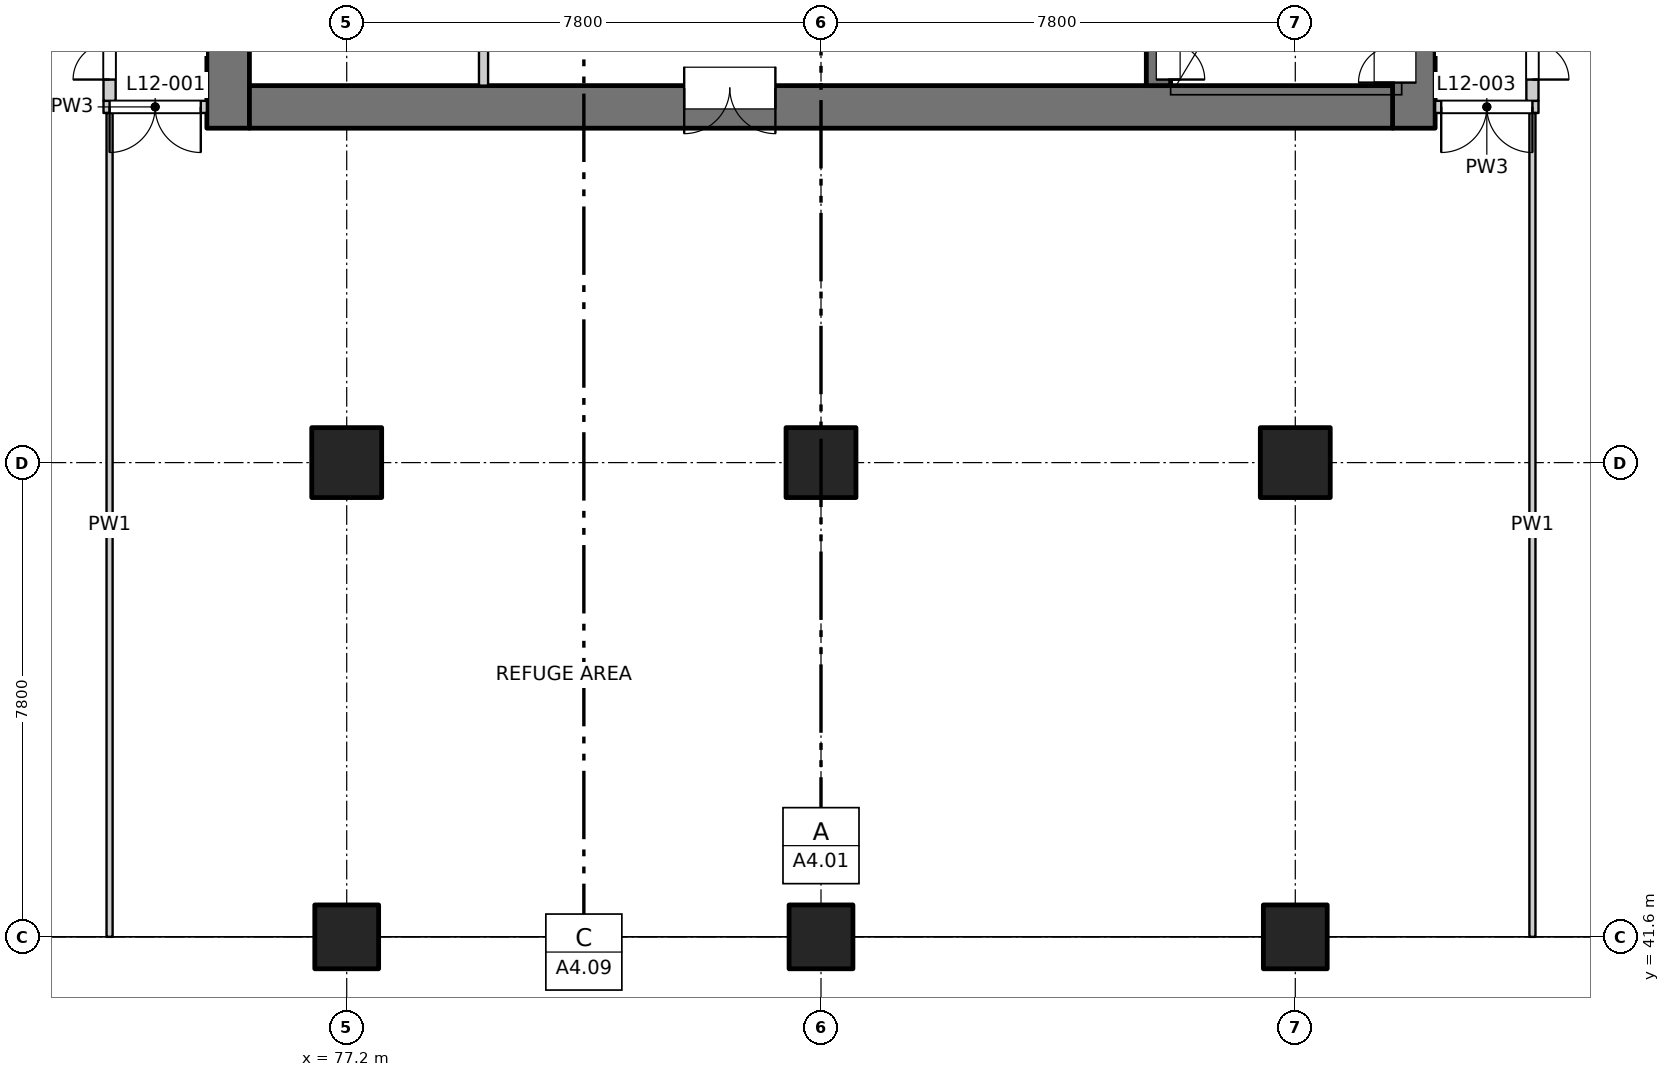
"""IFC4 building model, lengths in metres.
Left out: names, types, materials, properties, quantities, classifications, styles, units other than length and angle.
Written with IfcOpenShell. Run it as: python <this file> out.ifc"""

import sys

from ifc_helpers import new_model, si_unit, direction, frame, frame_2d, origin, origin_2d, place, context, subcontext, project, spatial, rectangle, extrude, element, fill, save


model = new_model("IFC4")
c1 = context("Model", 3, precision=1e-05, world=origin(), true_north=direction((0.0, 1.0)))
c2 = subcontext(c1, "Body", "Model", "MODEL_VIEW")
j1 = project(units=[si_unit("LENGTHUNIT", "METRE"), si_unit("PLANEANGLEUNIT", "RADIAN")], contexts=[c1])
p1 = place(None, origin())
s1 = spatial("IfcSite", under=j1, at=p1, CompositionType="ELEMENT")
p2 = place(p1, origin())
s2 = spatial("IfcBuilding", under=s1, at=p2, CompositionType="ELEMENT")
p3 = place(p2, frame((0.0, 0.0, 46.7)))
s3 = spatial("IfcBuildingStorey", under=s2, at=p3, CompositionType="ELEMENT", Elevation=46.7)
for number, where, z_axis, x_axis in (
    (1, (77.2, 41.6, -0.3), (0.0, 0.0, 1.0), (1.0, 0.0, 0.0)),
    (2, (85.0, 41.6, -0.3), (0.0, 0.0, 1.0), (1.0, 0.0, 0.0)),
    (3, (92.8, 41.6, -0.3), (0.0, 0.0, 1.0), (1.0, 0.0, 0.0)),
):
    element("IfcColumn", number, at=place(p3, frame(where, z_axis=z_axis, x_axis=x_axis)), inside=s3, PredefinedType="COLUMN", context=c2, shape_type="SweptSolid", body=[
        extrude(rectangle(XDim=1.05, YDim=1.05, at=origin_2d()), origin(), (0.0, 0.0, 1.0), 4.5),
    ])
for number, where, z_axis, x_axis in (
    (4, (77.2, 49.4, -0.3), (0.0, 0.0, 1.0), (1.0, 0.0, 0.0)),
    (5, (85.0, 49.4, -0.3), (0.0, 0.0, 1.0), (1.0, 0.0, 0.0)),
    (6, (92.8, 49.4, -0.3), (0.0, 0.0, 1.0), (1.0, 0.0, 0.0)),
):
    element("IfcColumn", number, at=place(p3, frame(where, z_axis=z_axis, x_axis=x_axis)), inside=s3, PredefinedType="COLUMN", context=c2, shape_type="SweptSolid", body=[
        extrude(rectangle(XDim=1.15, YDim=1.15, at=origin_2d()), origin(), (0.0, 0.0, 1.0), 4.5),
    ])
p4 = place(p3, frame((75.25, 54.9, -0.3), z_axis=(0.0, 0.0, 1.0), x_axis=(0.0, 1.0, 0.0)))
e7 = element("IfcWall", 7, at=p4, inside=s3, PredefinedType="SOLIDWALL", context=c2, shape_type="SweptSolid", body=[
    extrude(rectangle(XDim=22.4, YDim=0.7, at=frame_2d((11.2, 0.0))), origin(), (0.0, 0.0, 1.0), 4.5),
])
p5 = place(p4, frame((7.55, 0.0, 0.3)))
e8 = element("IfcOpeningElement", 8, at=p5, cuts=e7, PredefinedType="OPENING", context=c2, shape_type="SweptSolid", body=[
    extrude(rectangle(XDim=0.9, YDim=2.1, at=frame_2d((0.45, 1.05))), frame((0.0, 0.36, 0.0), z_axis=(0.0, -1.0, 0.0), x_axis=(1.0, 0.0, 0.0)), (0.0, 0.0, 1.0), 0.72),
])
p6 = place(p4, frame((10.85, 0.0, 0.3)))
e9 = element("IfcOpeningElement", 9, at=p6, cuts=e7, PredefinedType="OPENING", context=c2, shape_type="SweptSolid", body=[
    extrude(rectangle(XDim=0.9, YDim=2.1, at=frame_2d((0.45, 1.05))), frame((0.0, 0.36, 0.0), z_axis=(0.0, -1.0, 0.0), x_axis=(1.0, 0.0, 0.0)), (0.0, 0.0, 1.0), 0.72),
])
p7 = place(p4, frame((15.35, 0.0, 0.3)))
e10 = element("IfcOpeningElement", 10, at=p7, cuts=e7, PredefinedType="OPENING", context=c2, shape_type="SweptSolid", body=[
    extrude(rectangle(XDim=0.9, YDim=2.1, at=frame_2d((0.45, 1.05))), frame((0.0, 0.36, 0.0), z_axis=(0.0, -1.0, 0.0), x_axis=(1.0, 0.0, 0.0)), (0.0, 0.0, 1.0), 0.72),
])
p8 = place(p4, frame((20.15, 0.0, 0.3)))
e11 = element("IfcOpeningElement", 11, at=p8, cuts=e7, PredefinedType="OPENING", context=c2, shape_type="SweptSolid", body=[
    extrude(rectangle(XDim=0.9, YDim=2.1, at=frame_2d((0.45, 1.05))), frame((0.0, 0.36, 0.0), z_axis=(0.0, -1.0, 0.0), x_axis=(1.0, 0.0, 0.0)), (0.0, 0.0, 1.0), 0.72),
])
p9 = place(p3, frame((94.75, 54.9, -0.3), z_axis=(0.0, 0.0, 1.0), x_axis=(0.0, 1.0, 0.0)))
e12 = element("IfcWall", 12, at=p9, inside=s3, PredefinedType="SOLIDWALL", context=c2, shape_type="SweptSolid", body=[
    extrude(rectangle(XDim=7.05, YDim=0.7, at=frame_2d((3.525, 0.0))), origin(), (0.0, 0.0, 1.0), 4.5),
])
p10 = place(p9, frame((0.75, 0.0, 0.3)))
e13 = element("IfcOpeningElement", 13, at=p10, cuts=e12, PredefinedType="OPENING", context=c2, shape_type="SweptSolid", body=[
    extrude(rectangle(XDim=1.2, YDim=2.1, at=frame_2d((0.6, 1.05))), frame((0.0, 0.36, 0.0), z_axis=(0.0, -1.0, 0.0), x_axis=(1.0, 0.0, 0.0)), (0.0, 0.0, 1.0), 0.72),
])
p11 = place(p3, frame((75.6, 55.25, -0.3), z_axis=(0.0, 0.0, 1.0), x_axis=(1.0, 0.0, 0.0)))
e14 = element("IfcWall", 14, at=p11, inside=s3, PredefinedType="SOLIDWALL", context=c2, shape_type="SweptSolid", body=[
    extrude(rectangle(XDim=18.8, YDim=0.7, at=frame_2d((9.4, 0.0))), origin(), (0.0, 0.0, 1.0), 4.5),
])
p12 = place(p11, frame((7.15, 0.0, 0.3)))
e15 = element("IfcOpeningElement", 15, at=p12, cuts=e14, PredefinedType="OPENING", context=c2, shape_type="SweptSolid", body=[
    extrude(rectangle(XDim=1.5, YDim=2.1, at=frame_2d((0.75, 1.05))), frame((0.0, 0.36, 0.0), z_axis=(0.0, -1.0, 0.0), x_axis=(1.0, 0.0, 0.0)), (0.0, 0.0, 1.0), 0.72),
])
p13 = place(p3, frame((90.55, 55.6, -0.3), z_axis=(0.0, 0.0, 1.0), x_axis=(0.0, 1.0, 0.0)))
e16 = element("IfcWall", 16, at=p13, inside=s3, PredefinedType="SOLIDWALL", context=c2, shape_type="SweptSolid", body=[
    extrude(rectangle(XDim=6.35, YDim=0.4, at=frame_2d((3.175, 0.0))), origin(), (0.0, 0.0, 1.0), 4.5),
])
p14 = place(p13, frame((0.1, 0.0, 0.3)))
e17 = element("IfcOpeningElement", 17, at=p14, cuts=e16, PredefinedType="OPENING", context=c2, shape_type="SweptSolid", body=[
    extrude(rectangle(XDim=1.2, YDim=2.1, at=frame_2d((0.6, 1.05))), frame((0.0, 0.21, 0.0), z_axis=(0.0, -1.0, 0.0), x_axis=(1.0, 0.0, 0.0)), (0.0, 0.0, 1.0), 0.42),
])
p15 = place(p3, frame((73.2, 55.25, 0.0), z_axis=(0.0, 0.0, 1.0), x_axis=(1.0, 0.0, 0.0)))
e18 = element("IfcWall", 18, at=p15, inside=s3, PredefinedType="PARTITIONING", context=c2, shape_type="SweptSolid", body=[
    extrude(rectangle(XDim=1.7, YDim=0.2, at=frame_2d((0.85, 0.0))), origin(), (0.0, 0.0, 1.0), 4.2),
])
p16 = place(p15, frame((0.1, 0.0, 0.0)))
e19 = element("IfcOpeningElement", 19, at=p16, cuts=e18, PredefinedType="OPENING", context=c2, shape_type="SweptSolid", body=[
    extrude(rectangle(XDim=1.5, YDim=2.1, at=frame_2d((0.75, 1.05))), frame((0.0, 0.11, 0.0), z_axis=(0.0, -1.0, 0.0), x_axis=(1.0, 0.0, 0.0)), (0.0, 0.0, 1.0), 0.22),
])
p17 = place(p3, frame((95.1, 55.25, 0.0), z_axis=(0.0, 0.0, 1.0), x_axis=(1.0, 0.0, 0.0)))
e20 = element("IfcWall", 20, at=p17, inside=s3, PredefinedType="PARTITIONING", context=c2, shape_type="SweptSolid", body=[
    extrude(rectangle(XDim=1.7, YDim=0.2, at=frame_2d((0.85, 0.0))), origin(), (0.0, 0.0, 1.0), 4.2),
])
p18 = place(p17, frame((0.1, 0.0, 0.0)))
e21 = element("IfcOpeningElement", 21, at=p18, cuts=e20, PredefinedType="OPENING", context=c2, shape_type="SweptSolid", body=[
    extrude(rectangle(XDim=1.5, YDim=2.1, at=frame_2d((0.75, 1.05))), frame((0.0, 0.11, 0.0), z_axis=(0.0, -1.0, 0.0), x_axis=(1.0, 0.0, 0.0)), (0.0, 0.0, 1.0), 0.22),
])
p19 = place(p3, frame((73.3, 41.6, 0.0), z_axis=(0.0, 0.0, 1.0), x_axis=(0.0, 1.0, 0.0)))
e22 = element("IfcWall", 22, at=p19, inside=s3, PredefinedType="PARTITIONING", context=c2, shape_type="SweptSolid", body=[
    extrude(rectangle(XDim=13.55, YDim=0.1, at=frame_2d((6.775, 0.0))), origin(), (0.0, 0.0, 1.0), 4.2),
])
p20 = place(p3, frame((73.3, 55.35, 0.0), z_axis=(0.0, 0.0, 1.0), x_axis=(0.0, 1.0, 0.0)))
e23 = element("IfcWall", 23, at=p20, inside=s3, PredefinedType="PARTITIONING", context=c2, shape_type="SweptSolid", body=[
    extrude(rectangle(XDim=29.15, YDim=0.2, at=frame_2d((14.575, 0.0))), origin(), (0.0, 0.0, 1.0), 4.2),
])
p21 = place(p20, frame((0.35, 0.0, 0.0)))
e24 = element("IfcOpeningElement", 24, at=p21, cuts=e23, PredefinedType="OPENING", context=c2, shape_type="SweptSolid", body=[
    extrude(rectangle(XDim=1.2, YDim=2.1, at=frame_2d((0.6, 1.05))), frame((0.0, 0.11, 0.0), z_axis=(0.0, -1.0, 0.0), x_axis=(1.0, 0.0, 0.0)), (0.0, 0.0, 1.0), 0.22),
])
p22 = place(p20, frame((7.1, 0.0, 0.0)))
e25 = element("IfcOpeningElement", 25, at=p22, cuts=e23, PredefinedType="OPENING", context=c2, shape_type="SweptSolid", body=[
    extrude(rectangle(XDim=1.2, YDim=2.1, at=frame_2d((0.6, 1.05))), frame((0.0, 0.11, 0.0), z_axis=(0.0, -1.0, 0.0), x_axis=(1.0, 0.0, 0.0)), (0.0, 0.0, 1.0), 0.22),
])
p23 = place(p20, frame((18.8, 0.0, 0.0)))
e26 = element("IfcOpeningElement", 26, at=p23, cuts=e23, PredefinedType="OPENING", context=c2, shape_type="SweptSolid", body=[
    extrude(rectangle(XDim=1.2, YDim=2.1, at=frame_2d((0.6, 1.05))), frame((0.0, 0.11, 0.0), z_axis=(0.0, -1.0, 0.0), x_axis=(1.0, 0.0, 0.0)), (0.0, 0.0, 1.0), 0.22),
])
p24 = place(p20, frame((26.6, 0.0, 0.0)))
e27 = element("IfcOpeningElement", 27, at=p24, cuts=e23, PredefinedType="OPENING", context=c2, shape_type="SweptSolid", body=[
    extrude(rectangle(XDim=1.2, YDim=2.1, at=frame_2d((0.6, 1.05))), frame((0.0, 0.11, 0.0), z_axis=(0.0, -1.0, 0.0), x_axis=(1.0, 0.0, 0.0)), (0.0, 0.0, 1.0), 0.22),
])
p25 = place(p3, frame((79.45, 55.6, 0.0), z_axis=(0.0, 0.0, 1.0), x_axis=(0.0, 1.0, 0.0)))
e28 = element("IfcWall", 28, at=p25, inside=s3, PredefinedType="PARTITIONING", context=c2, shape_type="SweptSolid", body=[
    extrude(rectangle(XDim=5.3, YDim=0.15, at=frame_2d((2.65, 0.0))), origin(), (0.0, 0.0, 1.0), 4.2),
])
p26 = place(p25, frame((2.1, 0.0, 0.0)))
e29 = element("IfcOpeningElement", 29, at=p26, cuts=e28, PredefinedType="OPENING", context=c2, shape_type="SweptSolid", body=[
    extrude(rectangle(XDim=0.9, YDim=2.1, at=frame_2d((0.45, 1.05))), frame((0.0, 0.085, 0.0), z_axis=(0.0, -1.0, 0.0), x_axis=(1.0, 0.0, 0.0)), (0.0, 0.0, 1.0), 0.17),
])
p27 = place(p3, frame((96.7, 41.6, 0.0), z_axis=(0.0, 0.0, 1.0), x_axis=(0.0, 1.0, 0.0)))
e30 = element("IfcWall", 30, at=p27, inside=s3, PredefinedType="PARTITIONING", context=c2, shape_type="SweptSolid", body=[
    extrude(rectangle(XDim=13.55, YDim=0.1, at=frame_2d((6.775, 0.0))), origin(), (0.0, 0.0, 1.0), 4.2),
])
p28 = place(p3, frame((96.7, 55.35, 0.0), z_axis=(0.0, 0.0, 1.0), x_axis=(0.0, 1.0, 0.0)))
e31 = element("IfcWall", 31, at=p28, inside=s3, PredefinedType="PARTITIONING", context=c2, shape_type="SweptSolid", body=[
    extrude(rectangle(XDim=29.15, YDim=0.2, at=frame_2d((14.575, 0.0))), origin(), (0.0, 0.0, 1.0), 4.2),
])
p29 = place(p28, frame((0.35, 0.0, 0.0)))
e32 = element("IfcOpeningElement", 32, at=p29, cuts=e31, PredefinedType="OPENING", context=c2, shape_type="SweptSolid", body=[
    extrude(rectangle(XDim=1.2, YDim=2.1, at=frame_2d((0.6, 1.05))), frame((0.0, 0.11, 0.0), z_axis=(0.0, -1.0, 0.0), x_axis=(1.0, 0.0, 0.0)), (0.0, 0.0, 1.0), 0.22),
])
p30 = place(p28, frame((7.1, 0.0, 0.0)))
e33 = element("IfcOpeningElement", 33, at=p30, cuts=e31, PredefinedType="OPENING", context=c2, shape_type="SweptSolid", body=[
    extrude(rectangle(XDim=1.2, YDim=2.1, at=frame_2d((0.6, 1.05))), frame((0.0, 0.11, 0.0), z_axis=(0.0, -1.0, 0.0), x_axis=(1.0, 0.0, 0.0)), (0.0, 0.0, 1.0), 0.22),
])
p31 = place(p28, frame((22.7, 0.0, 0.0)))
e34 = element("IfcOpeningElement", 34, at=p31, cuts=e31, PredefinedType="OPENING", context=c2, shape_type="SweptSolid", body=[
    extrude(rectangle(XDim=1.2, YDim=2.1, at=frame_2d((0.6, 1.05))), frame((0.0, 0.11, 0.0), z_axis=(0.0, -1.0, 0.0), x_axis=(1.0, 0.0, 0.0)), (0.0, 0.0, 1.0), 0.22),
])
p32 = place(p28, frame((26.6, 0.0, 0.0)))
e35 = element("IfcOpeningElement", 35, at=p32, cuts=e31, PredefinedType="OPENING", context=c2, shape_type="SweptSolid", body=[
    extrude(rectangle(XDim=1.2, YDim=2.1, at=frame_2d((0.6, 1.05))), frame((0.0, 0.11, 0.0), z_axis=(0.0, -1.0, 0.0), x_axis=(1.0, 0.0, 0.0)), (0.0, 0.0, 1.0), 0.22),
])
p33 = place(p16, origin())
e36 = element("IfcDoor", 36, at=p33, inside=s3, OperationType="DOUBLE_DOOR_SINGLE_SWING", PredefinedType="DOOR", context=c2, shape_type="SweptSolid", body=[
    extrude(rectangle(XDim=1.5, YDim=2.1, at=frame_2d((0.75, 1.05))), frame((0.0, 0.025, 0.0), z_axis=(0.0, -1.0, 0.0), x_axis=(1.0, 0.0, 0.0)), (0.0, 0.0, 1.0), 0.05),
])
fill(e19, e36)
p34 = place(p12, origin())
e37 = element("IfcDoor", 37, at=p34, inside=s3, OperationType="DOUBLE_DOOR_SINGLE_SWING", PredefinedType="DOOR", context=c2, shape_type="SweptSolid", body=[
    extrude(rectangle(XDim=1.5, YDim=2.1, at=frame_2d((0.75, 1.05))), frame((0.0, 0.335, 0.0), z_axis=(0.0, -1.0, 0.0), x_axis=(1.0, 0.0, 0.0)), (0.0, 0.0, 1.0), 0.05),
])
fill(e15, e37)
p35 = place(p18, origin())
e38 = element("IfcDoor", 38, at=p35, inside=s3, OperationType="DOUBLE_DOOR_SINGLE_SWING", PredefinedType="DOOR", context=c2, shape_type="SweptSolid", body=[
    extrude(rectangle(XDim=1.5, YDim=2.1, at=frame_2d((0.75, 1.05))), frame((0.0, 0.025, 0.0), z_axis=(0.0, -1.0, 0.0), x_axis=(1.0, 0.0, 0.0)), (0.0, 0.0, 1.0), 0.05),
])
fill(e21, e38)
p36 = place(p14, origin())
e39 = element("IfcDoor", 39, at=p36, inside=s3, OperationType="DOUBLE_DOOR_SINGLE_SWING", PredefinedType="DOOR", context=c2, shape_type="SweptSolid", body=[
    extrude(rectangle(XDim=1.2, YDim=2.1, at=frame_2d((0.6, 1.05))), frame((0.0, -0.135, 0.0), z_axis=(0.0, -1.0, 0.0), x_axis=(1.0, 0.0, 0.0)), (0.0, 0.0, 1.0), 0.05),
])
fill(e17, e39)
p37 = place(p10, origin())
e40 = element("IfcDoor", 40, at=p37, inside=s3, OperationType="DOUBLE_DOOR_SINGLE_SWING", PredefinedType="DOOR", context=c2, shape_type="SweptSolid", body=[
    extrude(rectangle(XDim=1.2, YDim=2.1, at=frame_2d((0.6, 1.05))), frame((0.0, 0.335, 0.0), z_axis=(0.0, -1.0, 0.0), x_axis=(1.0, 0.0, 0.0)), (0.0, 0.0, 1.0), 0.05),
])
fill(e13, e40)
p38 = place(p21, origin())
e41 = element("IfcDoor", 41, at=p38, inside=s3, OperationType="DOUBLE_DOOR_SINGLE_SWING", PredefinedType="DOOR", context=c2, shape_type="SweptSolid", body=[
    extrude(rectangle(XDim=1.2, YDim=2.1, at=frame_2d((0.6, 1.05))), frame((0.0, 0.025, 0.0), z_axis=(0.0, -1.0, 0.0), x_axis=(1.0, 0.0, 0.0)), (0.0, 0.0, 1.0), 0.05),
])
fill(e24, e41)
p39 = place(p29, origin())
e42 = element("IfcDoor", 42, at=p39, inside=s3, OperationType="DOUBLE_DOOR_SINGLE_SWING", PredefinedType="DOOR", context=c2, shape_type="SweptSolid", body=[
    extrude(rectangle(XDim=1.2, YDim=2.1, at=frame_2d((0.6, 1.05))), frame((0.0, 0.025, 0.0), z_axis=(0.0, -1.0, 0.0), x_axis=(1.0, 0.0, 0.0)), (0.0, 0.0, 1.0), 0.05),
])
fill(e32, e42)
save(model, sys.argv[1])
